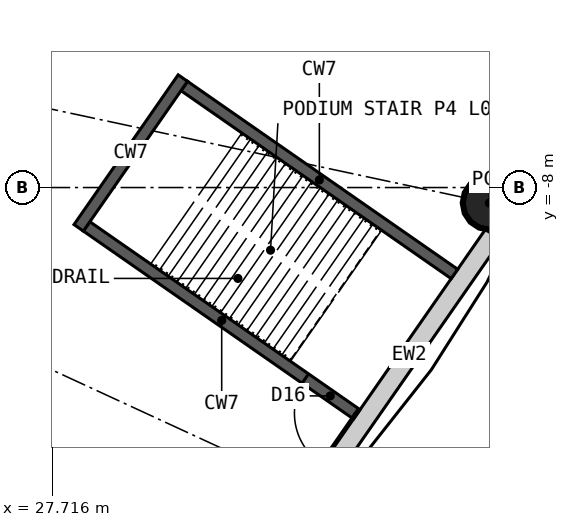
"""IFC4 building model, lengths in metres.
Left out: names, types, materials, properties, quantities, classifications, styles, units other than length and angle.
Written with IfcOpenShell. Run it as: python <this file> out.ifc"""

import sys

from ifc_helpers import new_model, si_unit, direction, frame, frame_2d, origin, origin_2d, place, context, subcontext, project, spatial, rectangle, circle, extrude, element, fill, save


model = new_model("IFC4")
c1 = context("Model", 3, precision=1e-05, world=origin(), true_north=direction((0.0, 1.0)))
c2 = subcontext(c1, "Body", "Model", "MODEL_VIEW")
j1 = project(units=[si_unit("LENGTHUNIT", "METRE"), si_unit("PLANEANGLEUNIT", "RADIAN")], contexts=[c1])
p1 = place(None, origin())
s1 = spatial("IfcSite", under=j1, at=p1, CompositionType="ELEMENT")
p2 = place(p1, origin())
s2 = spatial("IfcBuilding", under=s1, at=p2, CompositionType="ELEMENT")
p3 = place(p2, frame((0.0, 0.0, 13.8)))
s3 = spatial("IfcBuildingStorey", under=s2, at=p3, CompositionType="ELEMENT", Elevation=13.8)
p4 = place(p3, frame((39.218, -8.407, 0.0), z_axis=(0.0, 0.0, 1.0), x_axis=(1.0, 0.0, 0.0)))
e1 = element("IfcColumn", 1, at=p4, inside=s3, PredefinedType="COLUMN", context=c2, shape_type="SweptSolid", body=[
    extrude(circle(Radius=0.7, at=origin_2d()), origin(), (0.0, 0.0, 1.0), 5.4),
])
p5 = place(p3, frame((34.905, -15.592, 0.0), z_axis=(0.0, 0.0, 1.0), x_axis=(0.571029335057, 0.820929655028, 0.0)))
e2 = element("IfcWall", 2, at=p5, inside=s3, PredefinedType="SOLIDWALL", context=c2, shape_type="SweptSolid", body=[
    extrude(rectangle(XDim=7.733, YDim=0.5, at=frame_2d((3.866, 0.0))), origin(), (0.0, 0.0, 1.0), 5.15),
])
p6 = place(p3, frame((35.729, -13.968, 0.0), z_axis=(0.0, 0.0, 1.0), x_axis=(-0.82092761123, 0.571032273274, 0.0)))
e3 = element("IfcWall", 3, at=p6, inside=s3, PredefinedType="SHEAR", context=c2, shape_type="SweptSolid", body=[
    extrude(rectangle(XDim=8.66, YDim=0.3, at=frame_2d((4.33, 0.0))), origin(), (0.0, 0.0, 1.0), 5.4),
])
p7 = place(p6, frame((0.05, 0.0, 0.0)))
e4 = element("IfcOpeningElement", 4, at=p7, cuts=e3, PredefinedType="OPENING", context=c2, shape_type="SweptSolid", body=[
    extrude(rectangle(XDim=1.6, YDim=2.1, at=frame_2d((0.8, 1.05))), frame((0.0, 0.16, 0.0), z_axis=(0.0, -1.0, 0.0), x_axis=(1.0, 0.0, 0.0)), (0.0, 0.0, 1.0), 0.32),
])
p8 = place(p3, frame((38.299, -10.274, 0.0), z_axis=(0.0, 0.0, 1.0), x_axis=(-0.820936803751, 0.571019057692, 0.0)))
e5 = element("IfcWall", 5, at=p8, inside=s3, PredefinedType="SHEAR", context=c2, shape_type="SweptSolid", body=[
    extrude(rectangle(XDim=8.66, YDim=0.3, at=frame_2d((4.33, 0.0))), origin(), (0.0, 0.0, 1.0), 5.4),
])
p9 = place(p3, frame((28.412, -9.06, 0.0), z_axis=(0.0, 0.0, 1.0), x_axis=(0.571036173178, 0.820924898467, 0.0)))
e6 = element("IfcWall", 6, at=p9, inside=s3, PredefinedType="SHEAR", context=c2, shape_type="SweptSolid", body=[
    extrude(rectangle(XDim=4.8, YDim=0.3, at=frame_2d((2.4, 0.0))), origin(), (0.0, 0.0, 1.0), 5.4),
])
p10 = place(p7, origin())
e7 = element("IfcDoor", 7, at=p10, inside=s3, OperationType="SINGLE_SWING_LEFT", PredefinedType="DOOR", context=c2, shape_type="SweptSolid", body=[
    extrude(rectangle(XDim=1.6, YDim=2.1, at=frame_2d((0.8, 1.05))), frame((0.0, 0.025, 0.0), z_axis=(0.0, -1.0, 0.0), x_axis=(1.0, 0.0, 0.0)), (0.0, 0.0, 1.0), 0.05),
])
fill(e4, e7)
save(model, sys.argv[1])
